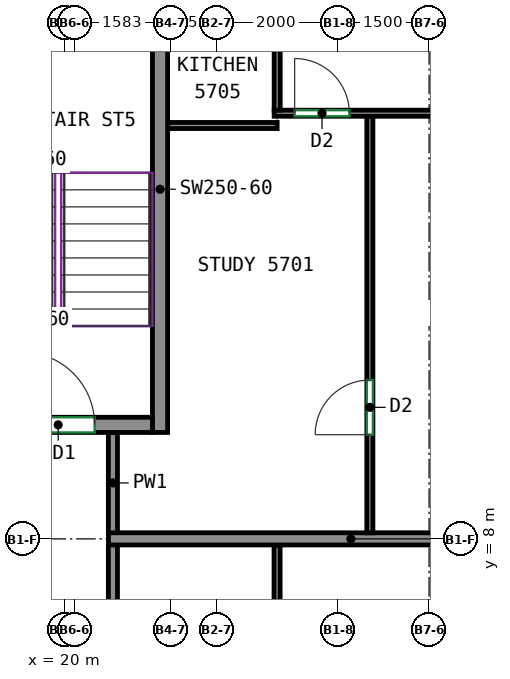
"""IFC4 building model, lengths in metres.
Left out: names, types, materials, properties, quantities, classifications, styles, units other than length and angle.
Written with IfcOpenShell. Run it as: python <this file> out.ifc"""

import sys

from ifc_helpers import new_model, si_unit, direction, frame, frame_2d, origin, place, context, subcontext, project, spatial, rectangle, extrude, source, transform, mapped, element, fill, save


model = new_model("IFC4")
c1 = context("Model", 3, precision=1e-05, world=origin(), true_north=direction((0.0, 1.0)))
c2 = subcontext(c1, "Body", "Model", "MODEL_VIEW")
j1 = project(units=[si_unit("LENGTHUNIT", "METRE"), si_unit("PLANEANGLEUNIT", "RADIAN")], contexts=[c1])
p1 = place(None, origin())
s1 = spatial("IfcSite", under=j1, at=p1, CompositionType="ELEMENT")
p2 = place(p1, origin())
s2 = spatial("IfcBuilding", under=s1, at=p2, CompositionType="ELEMENT")
p3 = place(p2, frame((0.0, 0.0, 239.0)))
s3 = spatial("IfcBuildingStorey", under=s2, at=p3, CompositionType="ELEMENT", Elevation=239.0)
m1 = source(origin(), c2, "Body", "SweptSolid", [
    extrude(rectangle(XDim=8.0, YDim=0.25, at=frame_2d((4.0, 0.0))), origin(), (0.0, 0.0, 1.0), 3.12),
])
p4 = place(p3, frame((21.575, 9.75, 0.0), z_axis=(0.0, 0.0, 1.0), x_axis=(0.0, 1.0, 0.0)))
e1 = element("IfcWall", 1, at=p4, inside=s3, PredefinedType="SHEAR", context=c2, shape_type="MappedRepresentation", body=[
    mapped(m1, transform((0.0, 0.0, 0.0))),
])
m2 = source(origin(), c2, "Body", "SweptSolid", [
    extrude(rectangle(XDim=3.1, YDim=0.25, at=frame_2d((1.55, 0.0))), origin(), (0.0, 0.0, 1.0), 3.12),
])
p5 = place(p3, frame((18.35, 9.875, 0.0), z_axis=(0.0, 0.0, 1.0), x_axis=(1.0, 0.0, 0.0)))
e2 = element("IfcWall", 2, at=p5, inside=s3, PredefinedType="SHEAR", context=c2, shape_type="MappedRepresentation", body=[
    mapped(m2, transform((0.0, 0.0, 0.0))),
])
p6 = place(p5, frame((0.95, 0.0, 0.0)))
e3 = element("IfcOpeningElement", 3, at=p6, cuts=e2, PredefinedType="OPENING", context=c2, shape_type="SweptSolid", body=[
    extrude(rectangle(XDim=1.2, YDim=2.1, at=frame_2d((0.6, 1.05))), frame((0.0, 0.135, 0.0), z_axis=(0.0, -1.0, 0.0), x_axis=(1.0, 0.0, 0.0)), (0.0, 0.0, 1.0), 0.27),
])
p7 = place(p3, frame((20.8, 3.623, 0.0), z_axis=(0.0, 0.0, 1.0), x_axis=(0.0, 1.0, 0.0)))
e4 = element("IfcWall", 4, at=p7, inside=s3, PredefinedType="PARTITIONING", context=c2, shape_type="SweptSolid", body=[
    extrude(rectangle(XDim=4.287, YDim=0.15, at=frame_2d((2.144, 0.0))), origin(), (0.0, 0.0, 1.0), 3.12),
])
p8 = place(p3, frame((20.8, 8.09, 0.0), z_axis=(0.0, 0.0, 1.0), x_axis=(0.0, 1.0, 0.0)))
e5 = element("IfcWall", 5, at=p8, inside=s3, PredefinedType="PARTITIONING", context=c2, shape_type="SweptSolid", body=[
    extrude(rectangle(XDim=1.66, YDim=0.15, at=frame_2d((0.83, 0.0))), origin(), (0.0, 0.0, 1.0), 3.12),
])
p9 = place(p3, frame((23.5, 3.633, 0.0), z_axis=(0.0, 0.0, 1.0), x_axis=(0.0, 1.0, 0.0)))
e6 = element("IfcWall", 6, at=p9, inside=s3, PredefinedType="PARTITIONING", context=c2, shape_type="SweptSolid", body=[
    extrude(rectangle(XDim=4.267, YDim=0.1, at=frame_2d((2.133, 0.0))), origin(), (0.0, 0.0, 1.0), 3.12),
])
p10 = place(p3, frame((20.727, 8.0, 0.0), z_axis=(0.0, 0.0, 1.0), x_axis=(1.0, 0.0, 0.0)))
e7 = element("IfcWall", 7, at=p10, inside=s3, PredefinedType="PARTITIONING", context=c2, shape_type="SweptSolid", body=[
    extrude(rectangle(XDim=7.973, YDim=0.2, at=frame_2d((3.986, 0.0))), origin(), (0.0, 0.0, 1.0), 2.57),
])
p11 = place(p3, frame((25.026, 8.1, 0.0), z_axis=(0.0, 0.0, 1.0), x_axis=(0.0, 1.0, 0.0)))
e8 = element("IfcWall", 8, at=p11, inside=s3, PredefinedType="PARTITIONING", context=c2, shape_type="SweptSolid", body=[
    extrude(rectangle(XDim=6.85, YDim=0.1, at=frame_2d((3.425, 0.0))), origin(), (0.0, 0.0, 1.0), 3.12),
])
p12 = place(p11, frame((1.613, 0.0, 0.0)))
e9 = element("IfcOpeningElement", 9, at=p12, cuts=e8, PredefinedType="OPENING", context=c2, shape_type="SweptSolid", body=[
    extrude(rectangle(XDim=0.9, YDim=2.1, at=frame_2d((0.45, 1.05))), frame((0.0, 0.06, 0.0), z_axis=(0.0, -1.0, 0.0), x_axis=(1.0, 0.0, 0.0)), (0.0, 0.0, 1.0), 0.12),
])
p13 = place(p3, frame((23.452, 15.0, 0.0), z_axis=(0.0, 0.0, 1.0), x_axis=(1.0, 0.0, 0.0)))
e10 = element("IfcWall", 10, at=p13, inside=s3, PredefinedType="PARTITIONING", context=c2, shape_type="SweptSolid", body=[
    extrude(rectangle(XDim=5.798, YDim=0.1, at=frame_2d((2.899, 0.0))), origin(), (0.0, 0.0, 1.0), 3.12),
])
p14 = place(p13, frame((0.337, 0.0, 0.0)))
e11 = element("IfcOpeningElement", 11, at=p14, cuts=e10, PredefinedType="OPENING", context=c2, shape_type="SweptSolid", body=[
    extrude(rectangle(XDim=0.9, YDim=2.1, at=frame_2d((0.45, 1.05))), frame((0.0, 0.06, 0.0), z_axis=(0.0, -1.0, 0.0), x_axis=(1.0, 0.0, 0.0)), (0.0, 0.0, 1.0), 0.12),
])
p15 = place(p3, frame((23.501, 14.798, 0.0), z_axis=(0.0, 0.0, 1.0), x_axis=(-1.0, 0.0, 0.0)))
e12 = element("IfcWall", 12, at=p15, inside=s3, PredefinedType="PARTITIONING", context=c2, shape_type="SweptSolid", body=[
    extrude(rectangle(XDim=1.801, YDim=0.1, at=frame_2d((0.9, 0.0))), origin(), (0.0, 0.0, 1.0), 3.12),
])
p16 = place(p3, frame((23.502, 15.05, 0.0), z_axis=(0.0, 0.0, 1.0), x_axis=(0.0, 1.0, 0.0)))
e13 = element("IfcWall", 13, at=p16, inside=s3, PredefinedType="PARTITIONING", context=c2, shape_type="SweptSolid", body=[
    extrude(rectangle(XDim=2.158, YDim=0.1, at=frame_2d((1.079, 0.0))), origin(), (0.0, 0.0, 1.0), 3.12),
])
p17 = place(p6, origin())
e14 = element("IfcDoor", 14, at=p17, inside=s3, OperationType="DOUBLE_DOOR_SINGLE_SWING", PredefinedType="DOOR", context=c2, shape_type="SweptSolid", body=[
    extrude(rectangle(XDim=1.2, YDim=2.1, at=frame_2d((0.6, 1.05))), frame((0.0, 0.025, 0.0), z_axis=(0.0, -1.0, 0.0), x_axis=(1.0, 0.0, 0.0)), (0.0, 0.0, 1.0), 0.05),
])
fill(e3, e14)
p18 = place(p12, origin())
e15 = element("IfcDoor", 15, at=p18, inside=s3, OperationType="SINGLE_SWING_LEFT", PredefinedType="DOOR", context=c2, shape_type="SweptSolid", body=[
    extrude(rectangle(XDim=0.9, YDim=2.1, at=frame_2d((0.45, 1.05))), frame((0.0, 0.025, 0.0), z_axis=(0.0, -1.0, 0.0), x_axis=(1.0, 0.0, 0.0)), (0.0, 0.0, 1.0), 0.05),
])
fill(e9, e15)
p19 = place(p14, origin())
e16 = element("IfcDoor", 16, at=p19, inside=s3, OperationType="SINGLE_SWING_LEFT", PredefinedType="DOOR", context=c2, shape_type="SweptSolid", body=[
    extrude(rectangle(XDim=0.9, YDim=2.1, at=frame_2d((0.45, 1.05))), frame((0.0, 0.025, 0.0), z_axis=(0.0, -1.0, 0.0), x_axis=(1.0, 0.0, 0.0)), (0.0, 0.0, 1.0), 0.05),
])
fill(e11, e16)
save(model, sys.argv[1])
